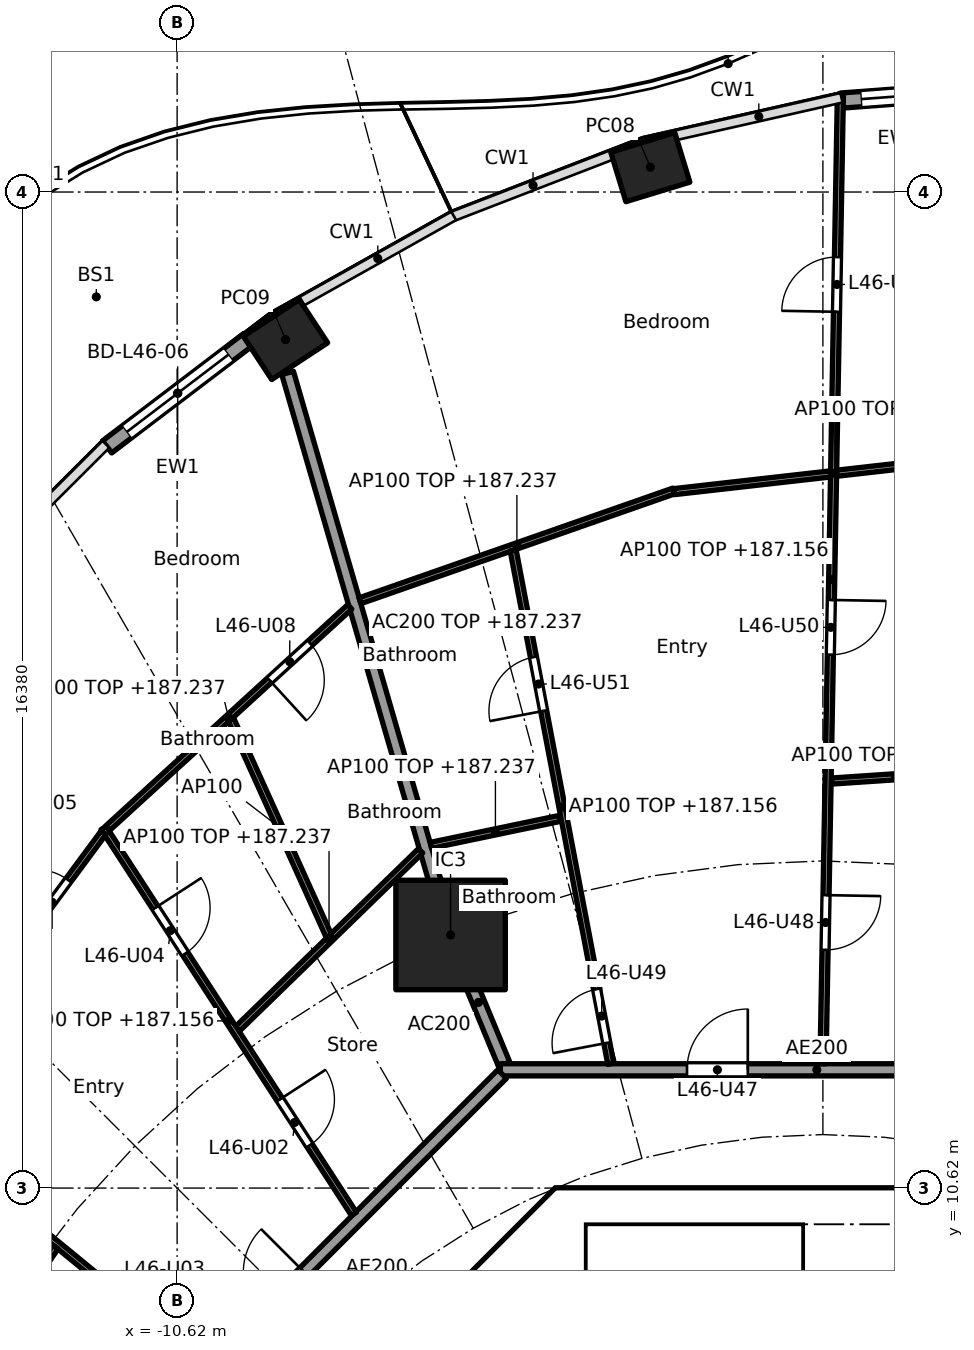
"""IFC4 building model, lengths in metres.
Left out: names, types, materials, properties, quantities, classifications, styles, units other than length and angle.
Written with IfcOpenShell. Run it as: python <this file> out.ifc"""

import sys

from ifc_helpers import new_model, si_unit, direction, frame, frame_2d, origin, origin_2d, place, context, subcontext, project, spatial, polyline, rectangle, hollow_rectangle, outline, extrude, element, fill, save


model = new_model("IFC4")
c1 = context("Model", 3, precision=1e-05, world=origin(), true_north=direction((0.0, 1.0)))
c2 = subcontext(c1, "Body", "Model", "MODEL_VIEW")
j1 = project(units=[si_unit("LENGTHUNIT", "METRE"), si_unit("PLANEANGLEUNIT", "RADIAN")], contexts=[c1])
p1 = place(None, origin())
s1 = spatial("IfcSite", under=j1, at=p1, CompositionType="ELEMENT")
p2 = place(p1, origin())
s2 = spatial("IfcBuilding", under=s1, at=p2, CompositionType="ELEMENT")
p3 = place(p2, frame((0.0, 0.0, 184.4)))
s3 = spatial("IfcBuildingStorey", under=s2, at=p3, CompositionType="ELEMENT", Elevation=184.4)
for number, where, z_axis, x_axis in (
    (1, (-2.838, 27.408, 0.0), (0.0, 0.0, 1.0), (-0.957, -0.292, 0.0)),
    (2, (-8.837, 24.573, 0.0), (0.0, 0.0, 1.0), (-0.836, -0.549, 0.0)),
):
    element("IfcColumn", number, at=place(p3, frame(where, z_axis=z_axis, x_axis=x_axis)), inside=s3, PredefinedType="COLUMN", context=c2, shape_type="SweptSolid", body=[
        extrude(hollow_rectangle(XDim=1.1, YDim=0.85, WallThickness=0.036, at=origin_2d()), origin(), (0.0, 0.0, 1.0), 3.7),
    ])
p4 = place(p3, frame((-6.123, 14.782, 0.0), z_axis=(0.0, 0.0, 1.0), x_axis=(1.0, 0.0, 0.0)))
e3 = element("IfcColumn", 3, at=p4, inside=s3, PredefinedType="COLUMN", context=c2, shape_type="SweptSolid", body=[
    extrude(rectangle(XDim=1.8, YDim=1.8, at=origin_2d()), origin(), (0.0, 0.0, 1.0), 3.7),
])
p5 = place(p3, frame((0.297, 28.503, 0.0), z_axis=(0.0, 0.0, 1.0), x_axis=(0.997232064422, 0.074351931305, 0.0)))
e4 = element("IfcWall", 4, at=p5, inside=s3, PredefinedType="SOLIDWALL", context=c2, shape_type="SweptSolid", body=[
    extrude(rectangle(XDim=2.771, YDim=0.25, at=frame_2d((1.386, 0.0))), origin(), (0.0, 0.0, 1.0), 3.44),
])
p6 = place(p5, frame((0.336, 0.0, 0.0)))
e5 = element("IfcOpeningElement", 5, at=p6, cuts=e4, PredefinedType="OPENING", context=c2, shape_type="SweptSolid", body=[
    extrude(rectangle(XDim=2.1, YDim=2.4, at=frame_2d((1.05, 1.2))), frame((0.0, 0.135, 0.0), z_axis=(0.0, -1.0, 0.0), x_axis=(1.0, 0.0, 0.0)), (0.0, 0.0, 1.0), 0.27),
])
p7 = place(p3, frame((-11.772, 22.809, 0.0), z_axis=(0.0, 0.0, 1.0), x_axis=(0.796055733703, 0.60522332146, 0.0)))
e6 = element("IfcWall", 6, at=p7, inside=s3, PredefinedType="SOLIDWALL", context=c2, shape_type="SweptSolid", body=[
    extrude(rectangle(XDim=2.917, YDim=0.25, at=frame_2d((1.458, 0.0))), origin(), (0.0, 0.0, 1.0), 3.44),
])
p8 = place(p7, frame((0.408, 0.0, 0.0)))
e7 = element("IfcOpeningElement", 7, at=p8, cuts=e6, PredefinedType="OPENING", context=c2, shape_type="SweptSolid", body=[
    extrude(rectangle(XDim=2.1, YDim=2.4, at=frame_2d((1.05, 1.2))), frame((0.0, 0.135, 0.0), z_axis=(0.0, -1.0, 0.0), x_axis=(1.0, 0.0, 0.0)), (0.0, 0.0, 1.0), 0.27),
])
p9 = place(p3, frame((-4.613, 9.988, 0.0), z_axis=(0.0, 0.0, 1.0), x_axis=(-0.707106781187, -0.707106781187, 0.0)))
e8 = element("IfcWall", 8, at=p9, inside=s3, PredefinedType="SHEAR", context=c2, shape_type="SweptSolid", body=[
    extrude(rectangle(XDim=7.602, YDim=0.6, at=frame_2d((3.801, 0.0))), origin(), (0.0, 0.0, 1.0), 3.44),
])
p10 = place(p9, frame((0.351, 0.0, 0.0)))
e9 = element("IfcOpeningElement", 9, at=p10, cuts=e8, PredefinedType="OPENING", context=c2, shape_type="SweptSolid", body=[
    extrude(rectangle(XDim=1.1, YDim=2.1, at=frame_2d((0.55, 1.05))), frame((0.0, 0.31, 0.0), z_axis=(0.0, -1.0, 0.0), x_axis=(1.0, 0.0, 0.0)), (0.0, 0.0, 1.0), 0.62),
])
p11 = place(p3, origin())
e10 = element("IfcWall", 10, at=p11, inside=s3, PredefinedType="SHEAR", context=c2, shape_type="SweptSolid", body=[
    extrude(outline(polyline([(-4.152, 10.025), (-4.401, 9.776), (-4.825, 10.2), (-4.401, 10.625), (4.401, 10.625), (4.825, 10.2), (4.401, 9.776), (4.152, 10.025), (-4.152, 10.025)])), origin(), (0.0, 0.0, 1.0), 3.44),
])
p12 = place(p3, origin())
e11 = element("IfcWall", 11, at=p12, inside=s3, PredefinedType="SOLIDWALL", context=c2, shape_type="SweptSolid", body=[
    extrude(outline(polyline([(-3.9, 7.025), (-4.1, 7.025), (-4.1, 10.025), (-3.9, 10.025), (-3.9, 7.025)])), origin(), (0.0, 0.0, 1.0), 3.44),
])
p13 = place(p3, frame((-5.243, 12.657, 0.0), z_axis=(0.0, 0.0, 1.0), x_axis=(-0.382707856524, 0.923869415315, 0.0)))
e12 = element("IfcWall", 12, at=p13, inside=s3, PredefinedType="PARTITIONING", context=c2, shape_type="SweptSolid", body=[
    extrude(rectangle(XDim=2.2, YDim=0.2, at=frame_2d((1.1, 0.0))), origin(), (0.0, 0.0, 1.0), 3.44),
])
p14 = place(p3, frame((-6.137, 14.83, 0.0), z_axis=(0.0, 0.0, 1.0), x_axis=(-0.278461169897, 0.96044748782, 0.0)))
e13 = element("IfcWall", 13, at=p14, inside=s3, PredefinedType="PARTITIONING", context=c2, shape_type="SweptSolid", body=[
    extrude(rectangle(XDim=9.573, YDim=0.2, at=frame_2d((4.787, 0.0))), origin(), (0.0, 0.0, 1.0), 2.837),
])
p15 = place(p3, frame((5.104, 12.565, 0.0), z_axis=(0.0, 0.0, 1.0), x_axis=(-1.0, 0.0, 0.0)))
e14 = element("IfcWall", 14, at=p15, inside=s3, PredefinedType="PARTITIONING", context=c2, shape_type="SweptSolid", body=[
    extrude(rectangle(XDim=10.409, YDim=0.2, at=frame_2d((5.205, 0.0))), origin(), (0.0, 0.0, 1.0), 3.44),
])
p16 = place(p15, frame((6.339, 0.0, 0.0)))
e15 = element("IfcOpeningElement", 15, at=p16, cuts=e14, PredefinedType="OPENING", context=c2, shape_type="SweptSolid", body=[
    extrude(rectangle(XDim=1.0, YDim=2.1, at=frame_2d((0.5, 1.05))), frame((0.0, 0.11, 0.0), z_axis=(0.0, -1.0, 0.0), x_axis=(1.0, 0.0, 0.0)), (0.0, 0.0, 1.0), 0.22),
])
p17 = place(p3, frame((-5.275, 12.494, 0.0), z_axis=(0.0, 0.0, 1.0), x_axis=(-0.707106781187, -0.707106781187, 0.0)))
e16 = element("IfcWall", 16, at=p17, inside=s3, PredefinedType="PARTITIONING", context=c2, shape_type="SweptSolid", body=[
    extrude(rectangle(XDim=10.209, YDim=0.2, at=frame_2d((5.104, 0.0))), origin(), (0.0, 0.0, 1.0), 3.44),
])
p18 = place(p17, frame((4.604, 0.0, 0.0)))
e17 = element("IfcOpeningElement", 17, at=p18, cuts=e16, PredefinedType="OPENING", context=c2, shape_type="SweptSolid", body=[
    extrude(rectangle(XDim=1.0, YDim=2.1, at=frame_2d((0.5, 1.05))), frame((0.0, 0.11, 0.0), z_axis=(0.0, -1.0, 0.0), x_axis=(1.0, 0.0, 0.0)), (0.0, 0.0, 1.0), 0.22),
])
p19 = place(p3, frame((2.244, 17.455, 0.0), z_axis=(0.0, 0.0, 1.0), x_axis=(-0.997756833447, -0.06694252243, 0.0)))
e18 = element("IfcWall", 18, at=p19, inside=s3, PredefinedType="PARTITIONING", context=c2, shape_type="SweptSolid", body=[
    extrude(rectangle(XDim=2.104, YDim=0.1, at=frame_2d((1.052, 0.0))), origin(), (0.0, 0.0, 1.0), 2.837),
])
p20 = place(p3, frame((2.842, 22.671, 0.0), z_axis=(0.0, 0.0, 1.0), x_axis=(-0.993660315081, -0.112424099879, 0.0)))
e19 = element("IfcWall", 19, at=p20, inside=s3, PredefinedType="PARTITIONING", context=c2, shape_type="SweptSolid", body=[
    extrude(rectangle(XDim=5.325, YDim=0.1, at=frame_2d((2.662, 0.0))), origin(), (0.0, 0.0, 1.0), 2.837),
])
p21 = place(p3, frame((0.002, 12.665, 0.0), z_axis=(0.0, 0.0, 1.0), x_axis=(0.01792079652, 0.999839409631, 0.0)))
e20 = element("IfcWall", 20, at=p21, inside=s3, PredefinedType="PARTITIONING", context=c2, shape_type="SweptSolid", body=[
    extrude(rectangle(XDim=15.926, YDim=0.1, at=frame_2d((7.963, 0.0))), origin(), (0.0, 0.0, 1.0), 2.756),
])
p22 = place(p21, frame((1.873, 0.0, 0.0)))
e21 = element("IfcOpeningElement", 21, at=p22, cuts=e20, PredefinedType="OPENING", context=c2, shape_type="SweptSolid", body=[
    extrude(rectangle(XDim=0.9, YDim=2.1, at=frame_2d((0.45, 1.05))), frame((0.0, 0.06, 0.0), z_axis=(0.0, -1.0, 0.0), x_axis=(1.0, 0.0, 0.0)), (0.0, 0.0, 1.0), 0.12),
])
p23 = place(p21, frame((6.728, 0.0, 0.0)))
e22 = element("IfcOpeningElement", 22, at=p23, cuts=e20, PredefinedType="OPENING", context=c2, shape_type="SweptSolid", body=[
    extrude(rectangle(XDim=0.9, YDim=2.1, at=frame_2d((0.45, 1.05))), frame((0.0, 0.06, 0.0), z_axis=(0.0, -1.0, 0.0), x_axis=(1.0, 0.0, 0.0)), (0.0, 0.0, 1.0), 0.12),
])
p24 = place(p21, frame((12.367, 0.0, 0.0)))
e23 = element("IfcOpeningElement", 23, at=p24, cuts=e20, PredefinedType="OPENING", context=c2, shape_type="SweptSolid", body=[
    extrude(rectangle(XDim=0.9, YDim=2.1, at=frame_2d((0.45, 1.05))), frame((0.0, 0.06, 0.0), z_axis=(0.0, -1.0, 0.0), x_axis=(1.0, 0.0, 0.0)), (0.0, 0.0, 1.0), 0.12),
])
p25 = place(p3, frame((-2.452, 22.083, 0.0), z_axis=(0.0, 0.0, 1.0), x_axis=(-0.943918212431, -0.330179357684, 0.0)))
e24 = element("IfcWall", 24, at=p25, inside=s3, PredefinedType="PARTITIONING", context=c2, shape_type="SweptSolid", body=[
    extrude(rectangle(XDim=5.467, YDim=0.1, at=frame_2d((2.734, 0.0))), origin(), (0.0, 0.0, 1.0), 2.837),
])
p26 = place(p3, frame((-3.488, 12.663, 0.0), z_axis=(0.0, 0.0, 1.0), x_axis=(-0.186783185485, 0.982401161247, 0.0)))
e25 = element("IfcWall", 25, at=p26, inside=s3, PredefinedType="PARTITIONING", context=c2, shape_type="SweptSolid", body=[
    extrude(rectangle(XDim=8.595, YDim=0.1, at=frame_2d((4.298, 0.0))), origin(), (0.0, 0.0, 1.0), 2.756),
])
p27 = place(p26, frame((0.35, 0.0, 0.0)))
e26 = element("IfcOpeningElement", 26, at=p27, cuts=e25, PredefinedType="OPENING", context=c2, shape_type="SweptSolid", body=[
    extrude(rectangle(XDim=0.9, YDim=2.1, at=frame_2d((0.45, 1.05))), frame((0.0, 0.06, 0.0), z_axis=(0.0, -1.0, 0.0), x_axis=(1.0, 0.0, 0.0)), (0.0, 0.0, 1.0), 0.12),
])
p28 = place(p26, frame((5.908, 0.0, 0.0)))
e27 = element("IfcOpeningElement", 27, at=p28, cuts=e25, PredefinedType="OPENING", context=c2, shape_type="SweptSolid", body=[
    extrude(rectangle(XDim=0.9, YDim=2.1, at=frame_2d((0.45, 1.05))), frame((0.0, 0.06, 0.0), z_axis=(0.0, -1.0, 0.0), x_axis=(1.0, 0.0, 0.0)), (0.0, 0.0, 1.0), 0.12),
])
p29 = place(p3, frame((-4.324, 16.699, 0.0), z_axis=(0.0, 0.0, 1.0), x_axis=(-0.978909151576, -0.204296042448, 0.0)))
e28 = element("IfcWall", 28, at=p29, inside=s3, PredefinedType="PARTITIONING", context=c2, shape_type="SweptSolid", body=[
    extrude(rectangle(XDim=2.168, YDim=0.1, at=frame_2d((1.084, 0.0))), origin(), (0.0, 0.0, 1.0), 2.837),
])
p30 = place(p3, frame((-6.616, 16.166, 0.0), z_axis=(0.0, 0.0, 1.0), x_axis=(-0.716919058692, -0.697156412352, 0.0)))
e29 = element("IfcWall", 29, at=p30, inside=s3, PredefinedType="PARTITIONING", context=c2, shape_type="SweptSolid", body=[
    extrude(rectangle(XDim=4.2, YDim=0.1, at=frame_2d((2.1, 0.0))), origin(), (0.0, 0.0, 1.0), 2.837),
])
p31 = place(p3, frame((-7.781, 20.178, 0.0), z_axis=(0.0, 0.0, 1.0), x_axis=(-0.73807320557, -0.674720640872, 0.0)))
e30 = element("IfcWall", 30, at=p31, inside=s3, PredefinedType="PARTITIONING", context=c2, shape_type="SweptSolid", body=[
    extrude(rectangle(XDim=5.399, YDim=0.1, at=frame_2d((2.699, 0.0))), origin(), (0.0, 0.0, 1.0), 2.837),
])
p32 = place(p31, frame((0.887, 0.0, 0.0)))
e31 = element("IfcOpeningElement", 31, at=p32, cuts=e30, PredefinedType="OPENING", context=c2, shape_type="SweptSolid", body=[
    extrude(rectangle(XDim=0.9, YDim=2.1, at=frame_2d((0.45, 1.05))), frame((0.0, 0.06, 0.0), z_axis=(0.0, -1.0, 0.0), x_axis=(1.0, 0.0, 0.0)), (0.0, 0.0, 1.0), 0.12),
])
p33 = place(p3, frame((-8.125, 14.765, 0.0), z_axis=(0.0, 0.0, 1.0), x_axis=(-0.411745679848, 0.911298795745, 0.0)))
e32 = element("IfcWall", 32, at=p33, inside=s3, PredefinedType="PARTITIONING", context=c2, shape_type="SweptSolid", body=[
    extrude(rectangle(XDim=3.909, YDim=0.1, at=frame_2d((1.955, 0.0))), origin(), (0.0, 0.0, 1.0), 3.44),
])
p34 = place(p3, frame((-7.712, 10.195, 0.0), z_axis=(0.0, 0.0, 1.0), x_axis=(-0.544179442551, 0.838968851809, 0.0)))
e33 = element("IfcWall", 33, at=p34, inside=s3, PredefinedType="PARTITIONING", context=c2, shape_type="SweptSolid", body=[
    extrude(rectangle(XDim=7.566, YDim=0.1, at=frame_2d((3.783, 0.0))), origin(), (0.0, 0.0, 1.0), 2.756),
])
p35 = place(p34, frame((1.343, 0.0, 0.0)))
e34 = element("IfcOpeningElement", 34, at=p35, cuts=e33, PredefinedType="OPENING", context=c2, shape_type="SweptSolid", body=[
    extrude(rectangle(XDim=0.9, YDim=2.1, at=frame_2d((0.45, 1.05))), frame((0.0, 0.06, 0.0), z_axis=(0.0, -1.0, 0.0), x_axis=(1.0, 0.0, 0.0)), (0.0, 0.0, 1.0), 0.12),
])
p36 = place(p34, frame((5.101, 0.0, 0.0)))
e35 = element("IfcOpeningElement", 35, at=p36, cuts=e33, PredefinedType="OPENING", context=c2, shape_type="SweptSolid", body=[
    extrude(rectangle(XDim=0.9, YDim=2.1, at=frame_2d((0.45, 1.05))), frame((0.0, 0.06, 0.0), z_axis=(0.0, -1.0, 0.0), x_axis=(1.0, 0.0, 0.0)), (0.0, 0.0, 1.0), 0.12),
])
p37 = place(p3, frame((-11.832, 16.461, 0.0), z_axis=(0.0, 0.0, 1.0), x_axis=(-0.594704483906, -0.803944386647, 0.0)))
e36 = element("IfcWall", 36, at=p37, inside=s3, PredefinedType="PARTITIONING", context=c2, shape_type="SweptSolid", body=[
    extrude(rectangle(XDim=5.672, YDim=0.1, at=frame_2d((2.836, 0.0))), origin(), (0.0, 0.0, 1.0), 2.837),
])
p38 = place(p37, frame((0.968, 0.0, 0.0)))
e37 = element("IfcOpeningElement", 37, at=p38, cuts=e36, PredefinedType="OPENING", context=c2, shape_type="SweptSolid", body=[
    extrude(rectangle(XDim=0.9, YDim=2.1, at=frame_2d((0.45, 1.05))), frame((0.0, 0.06, 0.0), z_axis=(0.0, -1.0, 0.0), x_axis=(1.0, 0.0, 0.0)), (0.0, 0.0, 1.0), 0.12),
])
p39 = place(p37, frame((3.804, 0.0, 0.0)))
e38 = element("IfcOpeningElement", 38, at=p39, cuts=e36, PredefinedType="OPENING", context=c2, shape_type="SweptSolid", body=[
    extrude(rectangle(XDim=0.9, YDim=2.1, at=frame_2d((0.45, 1.05))), frame((0.0, 0.06, 0.0), z_axis=(0.0, -1.0, 0.0), x_axis=(1.0, 0.0, 0.0)), (0.0, 0.0, 1.0), 0.12),
])
p40 = place(p3, frame((-10.189, 7.721, 0.0), z_axis=(0.0, 0.0, 1.0), x_axis=(-0.773121441079, 0.634258021112, 0.0)))
e39 = element("IfcWall", 39, at=p40, inside=s3, PredefinedType="PARTITIONING", context=c2, shape_type="SweptSolid", body=[
    extrude(rectangle(XDim=6.577, YDim=0.1, at=frame_2d((3.289, 0.0))), origin(), (0.0, 0.0, 1.0), 2.756),
])
p41 = place(p40, frame((1.104, 0.0, 0.0)))
e40 = element("IfcOpeningElement", 40, at=p41, cuts=e39, PredefinedType="OPENING", context=c2, shape_type="SweptSolid", body=[
    extrude(rectangle(XDim=0.9, YDim=2.1, at=frame_2d((0.45, 1.05))), frame((0.0, 0.06, 0.0), z_axis=(0.0, -1.0, 0.0), x_axis=(1.0, 0.0, 0.0)), (0.0, 0.0, 1.0), 0.12),
])
p42 = place(p40, frame((4.367, 0.0, 0.0)))
e41 = element("IfcOpeningElement", 41, at=p42, cuts=e39, PredefinedType="OPENING", context=c2, shape_type="SweptSolid", body=[
    extrude(rectangle(XDim=0.9, YDim=2.1, at=frame_2d((0.45, 1.05))), frame((0.0, 0.06, 0.0), z_axis=(0.0, -1.0, 0.0), x_axis=(1.0, 0.0, 0.0)), (0.0, 0.0, 1.0), 0.12),
])
p43 = place(p3, frame((-12.619, 9.65, 0.0), z_axis=(0.0, 0.0, 1.0), x_axis=(-0.561046521684, -0.82778427172, 0.0)))
e42 = element("IfcWall", 42, at=p43, inside=s3, PredefinedType="PARTITIONING", context=c2, shape_type="SweptSolid", body=[
    extrude(rectangle(XDim=4.109, YDim=0.1, at=frame_2d((2.054, 0.0))), origin(), (0.0, 0.0, 1.0), 3.44),
])
p44 = place(p6, origin())
e43 = element("IfcDoor", 43, at=p44, inside=s3, OperationType="SLIDING_TO_LEFT", PredefinedType="DOOR", context=c2, shape_type="SweptSolid", body=[
    extrude(rectangle(XDim=2.1, YDim=2.4, at=frame_2d((1.05, 1.2))), frame((0.0, 0.025, 0.0), z_axis=(0.0, -1.0, 0.0), x_axis=(1.0, 0.0, 0.0)), (0.0, 0.0, 1.0), 0.05),
])
fill(e5, e43)
p45 = place(p8, origin())
e44 = element("IfcDoor", 44, at=p45, inside=s3, OperationType="SLIDING_TO_LEFT", PredefinedType="DOOR", context=c2, shape_type="SweptSolid", body=[
    extrude(rectangle(XDim=2.1, YDim=2.4, at=frame_2d((1.05, 1.2))), frame((0.0, 0.025, 0.0), z_axis=(0.0, -1.0, 0.0), x_axis=(1.0, 0.0, 0.0)), (0.0, 0.0, 1.0), 0.05),
])
fill(e7, e44)
p46 = place(p10, origin())
e45 = element("IfcDoor", 45, at=p46, inside=s3, OperationType="SINGLE_SWING_RIGHT", PredefinedType="DOOR", context=c2, shape_type="SweptSolid", body=[
    extrude(rectangle(XDim=1.1, YDim=2.1, at=frame_2d((0.55, 1.05))), frame((0.0, 0.025, 0.0), z_axis=(0.0, -1.0, 0.0), x_axis=(1.0, 0.0, 0.0)), (0.0, 0.0, 1.0), 0.05),
])
fill(e9, e45)
p47 = place(p35, frame((0.9, 0.0, 0.0), x_axis=(-1.0, 0.0, 0.0)))
e46 = element("IfcDoor", 46, at=p47, inside=s3, OperationType="SINGLE_SWING_LEFT", PredefinedType="DOOR", context=c2, shape_type="SweptSolid", body=[
    extrude(rectangle(XDim=0.9, YDim=2.1, at=frame_2d((0.45, 1.05))), frame((0.0, 0.025, 0.0), z_axis=(0.0, -1.0, 0.0), x_axis=(1.0, 0.0, 0.0)), (0.0, 0.0, 1.0), 0.05),
])
fill(e34, e46)
p48 = place(p36, frame((0.9, 0.0, 0.0), x_axis=(-1.0, 0.0, 0.0)))
e47 = element("IfcDoor", 47, at=p48, inside=s3, OperationType="SINGLE_SWING_LEFT", PredefinedType="DOOR", context=c2, shape_type="SweptSolid", body=[
    extrude(rectangle(XDim=0.9, YDim=2.1, at=frame_2d((0.45, 1.05))), frame((0.0, 0.025, 0.0), z_axis=(0.0, -1.0, 0.0), x_axis=(1.0, 0.0, 0.0)), (0.0, 0.0, 1.0), 0.05),
])
fill(e35, e47)
p49 = place(p38, frame((0.9, 0.0, 0.0), x_axis=(-1.0, 0.0, 0.0)))
e48 = element("IfcDoor", 48, at=p49, inside=s3, OperationType="SINGLE_SWING_LEFT", PredefinedType="DOOR", context=c2, shape_type="SweptSolid", body=[
    extrude(rectangle(XDim=0.9, YDim=2.1, at=frame_2d((0.45, 1.05))), frame((0.0, 0.025, 0.0), z_axis=(0.0, -1.0, 0.0), x_axis=(1.0, 0.0, 0.0)), (0.0, 0.0, 1.0), 0.05),
])
fill(e37, e48)
p50 = place(p32, origin())
e49 = element("IfcDoor", 49, at=p50, inside=s3, OperationType="SINGLE_SWING_RIGHT", PredefinedType="DOOR", context=c2, shape_type="SweptSolid", body=[
    extrude(rectangle(XDim=0.9, YDim=2.1, at=frame_2d((0.45, 1.05))), frame((0.0, 0.025, 0.0), z_axis=(0.0, -1.0, 0.0), x_axis=(1.0, 0.0, 0.0)), (0.0, 0.0, 1.0), 0.05),
])
fill(e31, e49)
p51 = place(p16, frame((1.0, 0.0, 0.0), x_axis=(-1.0, 0.0, 0.0)))
e50 = element("IfcDoor", 50, at=p51, inside=s3, OperationType="SINGLE_SWING_RIGHT", PredefinedType="DOOR", context=c2, shape_type="SweptSolid", body=[
    extrude(rectangle(XDim=1.0, YDim=2.1, at=frame_2d((0.5, 1.05))), frame((0.0, 0.025, 0.0), z_axis=(0.0, -1.0, 0.0), x_axis=(1.0, 0.0, 0.0)), (0.0, 0.0, 1.0), 0.05),
])
fill(e15, e50)
p52 = place(p22, frame((0.9, 0.0, 0.0), x_axis=(-1.0, 0.0, 0.0)))
e51 = element("IfcDoor", 51, at=p52, inside=s3, OperationType="SINGLE_SWING_LEFT", PredefinedType="DOOR", context=c2, shape_type="SweptSolid", body=[
    extrude(rectangle(XDim=0.9, YDim=2.1, at=frame_2d((0.45, 1.05))), frame((0.0, 0.025, 0.0), z_axis=(0.0, -1.0, 0.0), x_axis=(1.0, 0.0, 0.0)), (0.0, 0.0, 1.0), 0.05),
])
fill(e21, e51)
p53 = place(p27, origin())
e52 = element("IfcDoor", 52, at=p53, inside=s3, OperationType="SINGLE_SWING_LEFT", PredefinedType="DOOR", context=c2, shape_type="SweptSolid", body=[
    extrude(rectangle(XDim=0.9, YDim=2.1, at=frame_2d((0.45, 1.05))), frame((0.0, 0.025, 0.0), z_axis=(0.0, -1.0, 0.0), x_axis=(1.0, 0.0, 0.0)), (0.0, 0.0, 1.0), 0.05),
])
fill(e26, e52)
p54 = place(p23, frame((0.9, 0.0, 0.0), x_axis=(-1.0, 0.0, 0.0)))
e53 = element("IfcDoor", 53, at=p54, inside=s3, OperationType="SINGLE_SWING_LEFT", PredefinedType="DOOR", context=c2, shape_type="SweptSolid", body=[
    extrude(rectangle(XDim=0.9, YDim=2.1, at=frame_2d((0.45, 1.05))), frame((0.0, 0.025, 0.0), z_axis=(0.0, -1.0, 0.0), x_axis=(1.0, 0.0, 0.0)), (0.0, 0.0, 1.0), 0.05),
])
fill(e22, e53)
p55 = place(p28, origin())
e54 = element("IfcDoor", 54, at=p55, inside=s3, OperationType="SINGLE_SWING_LEFT", PredefinedType="DOOR", context=c2, shape_type="SweptSolid", body=[
    extrude(rectangle(XDim=0.9, YDim=2.1, at=frame_2d((0.45, 1.05))), frame((0.0, 0.025, 0.0), z_axis=(0.0, -1.0, 0.0), x_axis=(1.0, 0.0, 0.0)), (0.0, 0.0, 1.0), 0.05),
])
fill(e27, e54)
p56 = place(p24, origin())
e55 = element("IfcDoor", 55, at=p56, inside=s3, OperationType="SINGLE_SWING_LEFT", PredefinedType="DOOR", context=c2, shape_type="SweptSolid", body=[
    extrude(rectangle(XDim=0.9, YDim=2.1, at=frame_2d((0.45, 1.05))), frame((0.0, 0.025, 0.0), z_axis=(0.0, -1.0, 0.0), x_axis=(1.0, 0.0, 0.0)), (0.0, 0.0, 1.0), 0.05),
])
fill(e23, e55)
save(model, sys.argv[1])
